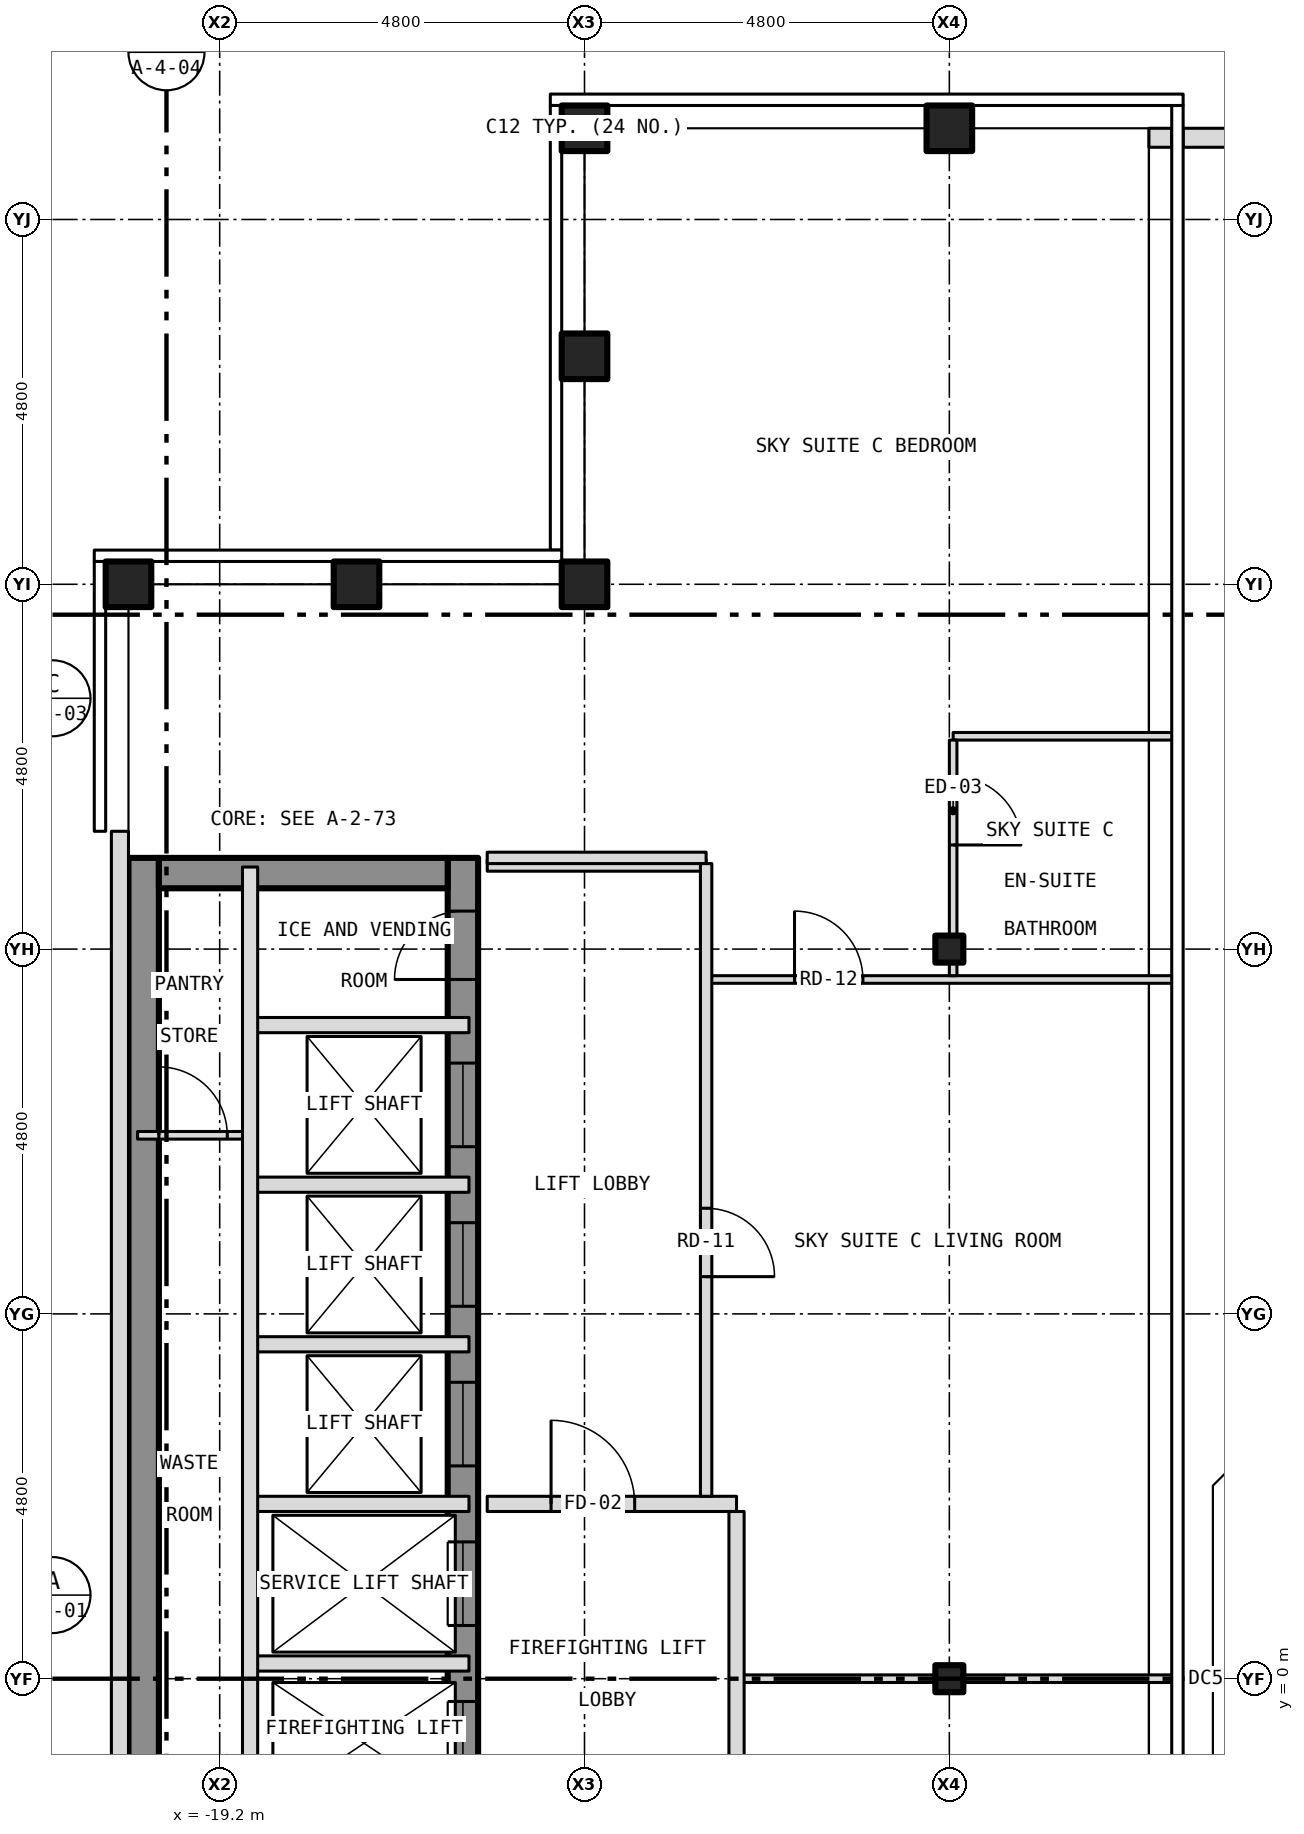
"""IFC4 building model, lengths in metres.
Left out: names, types, materials, properties, quantities, classifications, styles, units other than length and angle.
Written with IfcOpenShell. Run it as: python <this file> out.ifc"""

import sys

from ifc_helpers import new_model, si_unit, direction, frame, frame_2d, origin, origin_2d, place, context, subcontext, project, spatial, rectangle, hollow_rectangle, i_section, extrude, element, fill, save


model = new_model("IFC4")
c1 = context("Model", 3, precision=1e-05, world=origin(), true_north=direction((0.0, 1.0)))
c2 = subcontext(c1, "Body", "Model", "MODEL_VIEW")
j1 = project(units=[si_unit("LENGTHUNIT", "METRE"), si_unit("PLANEANGLEUNIT", "RADIAN")], contexts=[c1])
p1 = place(None, origin())
s1 = spatial("IfcSite", under=j1, at=p1, CompositionType="ELEMENT")
p2 = place(p1, origin())
s2 = spatial("IfcBuilding", under=s1, at=p2, CompositionType="ELEMENT")
p3 = place(p2, frame((0.0, 0.0, 265.5)))
s3 = spatial("IfcBuildingStorey", under=s2, at=p3, CompositionType="ELEMENT", Elevation=265.5)
for number, where, z_axis, x_axis in (
    (1, (-14.4, 20.4, -0.25), (0.0, 0.0, 1.0), (1.0, 0.0, 0.0)),
    (2, (-9.6, 20.4, -0.25), (0.0, 0.0, 1.0), (1.0, 0.0, 0.0)),
    (3, (-20.4, 14.4, -0.25), (0.0, 0.0, 1.0), (1.0, 0.0, 0.0)),
    (4, (-14.4, 14.4, -0.25), (0.0, 0.0, 1.0), (1.0, 0.0, 0.0)),
    (5, (-14.4, 17.4, -0.25), (0.0, 0.0, 1.0), (1.0, 0.0, 0.0)),
    (6, (-17.4, 14.4, -0.25), (0.0, 0.0, 1.0), (1.0, 0.0, 0.0)),
):
    element("IfcColumn", number, at=place(p3, frame(where, z_axis=z_axis, x_axis=x_axis)), inside=s3, PredefinedType="COLUMN", context=c2, shape_type="SweptSolid", body=[
        extrude(hollow_rectangle(XDim=0.6, YDim=0.6, WallThickness=0.03, at=origin_2d()), origin(), (0.0, 0.0, 1.0), 3.6),
    ])
for number, where, z_axis, x_axis in (
    (7, (-9.6, 0.0, -0.25), (0.0, 0.0, 1.0), (1.0, 0.0, 0.0)),
    (8, (-9.6, 9.6, -0.25), (0.0, 0.0, 1.0), (1.0, 0.0, 0.0)),
):
    element("IfcColumn", number, at=place(p3, frame(where, z_axis=z_axis, x_axis=x_axis)), inside=s3, PredefinedType="COLUMN", context=c2, shape_type="SweptSolid", body=[
        extrude(i_section(OverallWidth=0.368, OverallDepth=0.356, WebThickness=0.011, FlangeThickness=0.018, at=origin_2d()), origin(), (0.0, 0.0, 1.0), 3.6),
    ])
p4 = place(p3, frame((-16.0, -10.8, 0.0), z_axis=(0.0, 0.0, 1.0), x_axis=(0.0, 1.0, 0.0)))
e9 = element("IfcWall", 9, at=p4, inside=s3, PredefinedType="SHEAR", context=c2, shape_type="SweptSolid", body=[
    extrude(rectangle(XDim=21.6, YDim=0.4, at=frame_2d((10.8, 0.0))), origin(), (0.0, 0.0, 1.0), 3.25),
])
p5 = place(p4, frame((9.4, 0.0, 0.0)))
e10 = element("IfcOpeningElement", 10, at=p5, cuts=e9, PredefinedType="OPENING", context=c2, shape_type="SweptSolid", body=[
    extrude(rectangle(XDim=1.1, YDim=2.1, at=frame_2d((0.55, 1.05))), frame((0.0, 0.212, 0.0), z_axis=(0.0, -1.0, 0.0), x_axis=(1.0, 0.0, 0.0)), (0.0, 0.0, 1.0), 0.424),
])
p6 = place(p4, frame((11.5, 0.0, 0.0)))
e11 = element("IfcOpeningElement", 11, at=p6, cuts=e9, PredefinedType="OPENING", context=c2, shape_type="SweptSolid", body=[
    extrude(rectangle(XDim=1.1, YDim=2.1, at=frame_2d((0.55, 1.05))), frame((0.0, 0.212, 0.0), z_axis=(0.0, -1.0, 0.0), x_axis=(1.0, 0.0, 0.0)), (0.0, 0.0, 1.0), 0.424),
])
p7 = place(p4, frame((13.6, 0.0, 0.0)))
e12 = element("IfcOpeningElement", 12, at=p7, cuts=e9, PredefinedType="OPENING", context=c2, shape_type="SweptSolid", body=[
    extrude(rectangle(XDim=1.1, YDim=2.1, at=frame_2d((0.55, 1.05))), frame((0.0, 0.212, 0.0), z_axis=(0.0, -1.0, 0.0), x_axis=(1.0, 0.0, 0.0)), (0.0, 0.0, 1.0), 0.424),
])
p8 = place(p4, frame((15.7, 0.0, 0.0)))
e13 = element("IfcOpeningElement", 13, at=p8, cuts=e9, PredefinedType="OPENING", context=c2, shape_type="SweptSolid", body=[
    extrude(rectangle(XDim=1.1, YDim=2.1, at=frame_2d((0.55, 1.05))), frame((0.0, 0.212, 0.0), z_axis=(0.0, -1.0, 0.0), x_axis=(1.0, 0.0, 0.0)), (0.0, 0.0, 1.0), 0.424),
])
p9 = place(p4, frame((17.8, 0.0, 0.0)))
e14 = element("IfcOpeningElement", 14, at=p9, cuts=e9, PredefinedType="OPENING", context=c2, shape_type="SweptSolid", body=[
    extrude(rectangle(XDim=1.1, YDim=2.1, at=frame_2d((0.55, 1.05))), frame((0.0, 0.212, 0.0), z_axis=(0.0, -1.0, 0.0), x_axis=(1.0, 0.0, 0.0)), (0.0, 0.0, 1.0), 0.424),
])
p10 = place(p4, frame((0.458, 0.0, 0.0)))
e15 = element("IfcOpeningElement", 15, at=p10, cuts=e9, PredefinedType="OPENING", context=c2, shape_type="SweptSolid", body=[
    extrude(rectangle(XDim=1.1, YDim=2.1, at=frame_2d((0.55, 1.05))), frame((0.0, 0.212, 0.0), z_axis=(0.0, -1.0, 0.0), x_axis=(1.0, 0.0, 0.0)), (0.0, 0.0, 1.0), 0.424),
])
p11 = place(p4, frame((7.5, 0.0, 0.0)))
e16 = element("IfcOpeningElement", 16, at=p11, cuts=e9, PredefinedType="OPENING", context=c2, shape_type="SweptSolid", body=[
    extrude(rectangle(XDim=1.1, YDim=2.1, at=frame_2d((0.55, 1.05))), frame((0.0, 0.212, 0.0), z_axis=(0.0, -1.0, 0.0), x_axis=(1.0, 0.0, 0.0)), (0.0, 0.0, 1.0), 0.424),
])
p12 = place(p4, frame((20.0, 0.0, 0.0)))
e17 = element("IfcOpeningElement", 17, at=p12, cuts=e9, PredefinedType="OPENING", context=c2, shape_type="SweptSolid", body=[
    extrude(rectangle(XDim=0.9, YDim=2.1, at=frame_2d((0.45, 1.05))), frame((0.0, 0.212, 0.0), z_axis=(0.0, -1.0, 0.0), x_axis=(1.0, 0.0, 0.0)), (0.0, 0.0, 1.0), 0.424),
])
p13 = place(p3, frame((-20.2, -10.8, 0.0), z_axis=(0.0, 0.0, 1.0), x_axis=(0.0, 1.0, 0.0)))
e18 = element("IfcWall", 18, at=p13, inside=s3, PredefinedType="SHEAR", context=c2, shape_type="SweptSolid", body=[
    extrude(rectangle(XDim=21.6, YDim=0.4, at=frame_2d((10.8, 0.0))), origin(), (0.0, 0.0, 1.0), 3.25),
])
p14 = place(p3, frame((-20.0, 10.6, 0.0), z_axis=(0.0, 0.0, 1.0), x_axis=(1.0, 0.0, 0.0)))
e19 = element("IfcWall", 19, at=p14, inside=s3, PredefinedType="SHEAR", context=c2, shape_type="SweptSolid", body=[
    extrude(rectangle(XDim=3.8, YDim=0.4, at=frame_2d((1.9, 0.0))), origin(), (0.0, 0.0, 1.0), 3.25),
])
p15 = place(p3, frame((-20.512, 11.15, 0.0), z_axis=(0.0, 0.0, 1.0), x_axis=(0.0, -1.0, 0.0)))
e20 = element("IfcWall", 20, at=p15, inside=s3, PredefinedType="SOLIDWALL", context=c2, shape_type="SweptSolid", body=[
    extrude(rectangle(XDim=22.3, YDim=0.225, at=frame_2d((11.15, 0.0))), origin(), (0.0, 0.0, 1.0), 3.5),
])
p16 = place(p15, frame((18.4, 0.0, 1.0)))
e21 = element("IfcOpeningElement", 21, at=p16, cuts=e20, PredefinedType="OPENING", context=c2, shape_type="SweptSolid", body=[
    extrude(rectangle(XDim=0.6, YDim=1.5, at=frame_2d((0.3, 0.75))), frame((0.0, 0.125, 0.0), z_axis=(0.0, -1.0, 0.0), x_axis=(1.0, 0.0, 0.0)), (0.0, 0.0, 1.0), 0.249),
])
p17 = place(p3, frame((6.524, 20.275, 0.0), z_axis=(0.0, 0.0, 1.0), x_axis=(-1.0, 0.0, 0.0)))
e22 = element("IfcWall", 22, at=p17, inside=s3, PredefinedType="PARAPET", context=c2, shape_type="SweptSolid", body=[
    extrude(rectangle(XDim=13.048, YDim=0.25, at=frame_2d((6.524, 0.0))), origin(), (0.0, 0.0, 1.0), 1.1),
])
p18 = place(p3, frame((-6.674, 20.275, 0.0), z_axis=(0.0, 0.0, 1.0), x_axis=(-1.0, 0.0, 0.0)))
e23 = element("IfcWall", 23, at=p18, inside=s3, PredefinedType="PARAPET", context=c2, shape_type="SweptSolid", body=[
    extrude(rectangle(XDim=0.3, YDim=0.25, at=frame_2d((0.15, 0.0))), origin(), (0.0, 0.0, 1.0), 1.1),
])
p19 = place(p3, frame((-12.4, 0.0, 0.0), z_axis=(0.0, 0.0, 1.0), x_axis=(1.0, 0.0, 0.0)))
e24 = element("IfcWall", 24, at=p19, inside=s3, PredefinedType="PARTITIONING", context=c2, shape_type="SweptSolid", body=[
    extrude(rectangle(XDim=2.616, YDim=0.1, at=frame_2d((1.308, 0.0))), origin(), (0.0, 0.0, 1.0), 2.728),
])
p20 = place(p3, frame((-9.784, 0.0, 0.0), z_axis=(0.0, 0.0, 1.0), x_axis=(1.0, 0.0, 0.0)))
e25 = element("IfcWall", 25, at=p20, inside=s3, PredefinedType="PARTITIONING", context=c2, shape_type="SweptSolid", body=[
    extrude(rectangle(XDim=0.368, YDim=0.1, at=frame_2d((0.184, 0.0))), origin(), (0.0, 0.0, 1.0), 3.35),
])
p21 = place(p3, frame((-9.416, 0.0, 0.0), z_axis=(0.0, 0.0, 1.0), x_axis=(1.0, 0.0, 0.0)))
e26 = element("IfcWall", 26, at=p21, inside=s3, PredefinedType="PARTITIONING", context=c2, shape_type="SweptSolid", body=[
    extrude(rectangle(XDim=2.772, YDim=0.1, at=frame_2d((1.386, 0.0))), origin(), (0.0, 0.0, 1.0), 2.728),
])
for number, where, z_axis, x_axis in (
    (27, (-18.8, 0.2, 0.0), (0.0, 0.0, 1.0), (1.0, 0.0, 0.0)),
    (28, (-18.8, 2.3, 0.0), (0.0, 0.0, 1.0), (1.0, 0.0, 0.0)),
):
    element("IfcWall", number, at=place(p3, frame(where, z_axis=z_axis, x_axis=x_axis)), inside=s3, PredefinedType="PARTITIONING", context=c2, shape_type="SweptSolid", body=[
        extrude(rectangle(XDim=2.88, YDim=0.2, at=frame_2d((1.44, 0.0))), origin(), (0.0, 0.0, 1.0), 3.25),
    ])
p22 = place(p3, frame((-15.68, 2.3, 0.0), z_axis=(0.0, 0.0, 1.0), x_axis=(1.0, 0.0, 0.0)))
e29 = element("IfcWall", 29, at=p22, inside=s3, PredefinedType="PARTITIONING", context=c2, shape_type="SweptSolid", body=[
    extrude(rectangle(XDim=3.28, YDim=0.2, at=frame_2d((1.64, 0.0))), origin(), (0.0, 0.0, 1.0), 3.35),
])
p23 = place(p22, frame((0.84, 0.0, 0.0)))
e30 = element("IfcOpeningElement", 30, at=p23, cuts=e29, PredefinedType="OPENING", context=c2, shape_type="SweptSolid", body=[
    extrude(rectangle(XDim=1.1, YDim=2.1, at=frame_2d((0.55, 1.05))), frame((0.0, 0.112, 0.0), z_axis=(0.0, -1.0, 0.0), x_axis=(1.0, 0.0, 0.0)), (0.0, 0.0, 1.0), 0.224),
])
for number, where, z_axis, x_axis in (
    (31, (-18.8, 4.4, 0.0), (0.0, 0.0, 1.0), (1.0, 0.0, 0.0)),
    (32, (-18.8, 6.5, 0.0), (0.0, 0.0, 1.0), (1.0, 0.0, 0.0)),
):
    element("IfcWall", number, at=place(p3, frame(where, z_axis=z_axis, x_axis=x_axis)), inside=s3, PredefinedType="PARTITIONING", context=c2, shape_type="SweptSolid", body=[
        extrude(rectangle(XDim=2.88, YDim=0.2, at=frame_2d((1.44, 0.0))), origin(), (0.0, 0.0, 1.0), 3.25),
    ])
p24 = place(p3, frame((-20.28, 7.15, 0.0), z_axis=(0.0, 0.0, 1.0), x_axis=(1.0, 0.0, 0.0)))
e33 = element("IfcWall", 33, at=p24, inside=s3, PredefinedType="PARTITIONING", context=c2, shape_type="SweptSolid", body=[
    extrude(rectangle(XDim=1.48, YDim=0.1, at=frame_2d((0.74, 0.0))), origin(), (0.0, 0.0, 1.0), 3.25),
])
p25 = place(p24, frame((0.28, 0.0, 0.0)))
e34 = element("IfcOpeningElement", 34, at=p25, cuts=e33, PredefinedType="OPENING", context=c2, shape_type="SweptSolid", body=[
    extrude(rectangle(XDim=0.9, YDim=2.1, at=frame_2d((0.45, 1.05))), frame((0.0, 0.062, 0.0), z_axis=(0.0, -1.0, 0.0), x_axis=(1.0, 0.0, 0.0)), (0.0, 0.0, 1.0), 0.124),
])
p26 = place(p3, frame((-18.8, 8.6, 0.0), z_axis=(0.0, 0.0, 1.0), x_axis=(1.0, 0.0, 0.0)))
e35 = element("IfcWall", 35, at=p26, inside=s3, PredefinedType="PARTITIONING", context=c2, shape_type="SweptSolid", body=[
    extrude(rectangle(XDim=2.88, YDim=0.2, at=frame_2d((1.44, 0.0))), origin(), (0.0, 0.0, 1.0), 3.25),
])
p27 = place(p3, frame((-12.8, 9.2, 0.0), z_axis=(0.0, 0.0, 1.0), x_axis=(1.0, 0.0, 0.0)))
e36 = element("IfcWall", 36, at=p27, inside=s3, PredefinedType="PARTITIONING", context=c2, shape_type="SweptSolid", body=[
    extrude(rectangle(XDim=6.156, YDim=0.1, at=frame_2d((3.078, 0.0))), origin(), (0.0, 0.0, 1.0), 3.35),
])
p28 = place(p27, frame((1.163, 0.0, 0.0)))
e37 = element("IfcOpeningElement", 37, at=p28, cuts=e36, PredefinedType="OPENING", context=c2, shape_type="SweptSolid", body=[
    extrude(rectangle(XDim=0.9, YDim=2.1, at=frame_2d((0.45, 1.05))), frame((0.0, 0.062, 0.0), z_axis=(0.0, -1.0, 0.0), x_axis=(1.0, 0.0, 0.0)), (0.0, 0.0, 1.0), 0.124),
])
for number, where, z_axis, x_axis in (
    (38, (-15.68, 10.7, 0.0), (0.0, 0.0, 1.0), (1.0, 0.0, 0.0)),
    (39, (-15.68, 10.8, 0.0), (0.0, 0.0, 1.0), (1.0, 0.0, 0.0)),
):
    element("IfcWall", number, at=place(p3, frame(where, z_axis=z_axis, x_axis=x_axis)), inside=s3, PredefinedType="PARTITIONING", context=c2, shape_type="SweptSolid", body=[
        extrude(rectangle(XDim=2.88, YDim=0.15, at=frame_2d((1.44, 0.0))), origin(), (0.0, 0.0, 1.0), 3.35),
    ])
p29 = place(p3, frame((-9.55, 12.4, 0.0), z_axis=(0.0, 0.0, 1.0), x_axis=(1.0, 0.0, 0.0)))
e40 = element("IfcWall", 40, at=p29, inside=s3, PredefinedType="PARTITIONING", context=c2, shape_type="SweptSolid", body=[
    extrude(rectangle(XDim=2.906, YDim=0.1, at=frame_2d((1.453, 0.0))), origin(), (0.0, 0.0, 1.0), 3.35),
])
p30 = place(p3, frame((-18.8, -1.8, 0.0), z_axis=(0.0, 0.0, 1.0), x_axis=(0.0, 1.0, 0.0)))
e41 = element("IfcWall", 41, at=p30, inside=s3, PredefinedType="PARTITIONING", context=c2, shape_type="SweptSolid", body=[
    extrude(rectangle(XDim=12.48, YDim=0.2, at=frame_2d((6.24, 0.0))), origin(), (0.0, 0.0, 1.0), 3.25),
])
p31 = place(p3, frame((-12.8, 2.4, 0.0), z_axis=(0.0, 0.0, 1.0), x_axis=(0.0, 1.0, 0.0)))
e42 = element("IfcWall", 42, at=p31, inside=s3, PredefinedType="PARTITIONING", context=c2, shape_type="SweptSolid", body=[
    extrude(rectangle(XDim=8.325, YDim=0.15, at=frame_2d((4.163, 0.0))), origin(), (0.0, 0.0, 1.0), 3.35),
])
p32 = place(p31, frame((2.89, 0.0, 0.0)))
e43 = element("IfcOpeningElement", 43, at=p32, cuts=e42, PredefinedType="OPENING", context=c2, shape_type="SweptSolid", body=[
    extrude(rectangle(XDim=0.9, YDim=2.1, at=frame_2d((0.45, 1.05))), frame((0.0, 0.087, 0.0), z_axis=(0.0, -1.0, 0.0), x_axis=(1.0, 0.0, 0.0)), (0.0, 0.0, 1.0), 0.174),
])
p33 = place(p3, frame((-12.4, -1.8, 0.0), z_axis=(0.0, 0.0, 1.0), x_axis=(0.0, 1.0, 0.0)))
e44 = element("IfcWall", 44, at=p33, inside=s3, PredefinedType="PARTITIONING", context=c2, shape_type="SweptSolid", body=[
    extrude(rectangle(XDim=4.0, YDim=0.2, at=frame_2d((2.0, 0.0))), origin(), (0.0, 0.0, 1.0), 3.35),
])
p34 = place(p3, frame((-9.55, 9.25, 0.0), z_axis=(0.0, 0.0, 1.0), x_axis=(0.0, 1.0, 0.0)))
e45 = element("IfcWall", 45, at=p34, inside=s3, PredefinedType="PARTITIONING", context=c2, shape_type="SweptSolid", body=[
    extrude(rectangle(XDim=0.534, YDim=0.1, at=frame_2d((0.267, 0.0))), origin(), (0.0, 0.0, 1.0), 3.35),
])
p35 = place(p3, frame((-9.55, 9.784, 0.0), z_axis=(0.0, 0.0, 1.0), x_axis=(0.0, 1.0, 0.0)))
e46 = element("IfcWall", 46, at=p35, inside=s3, PredefinedType="PARTITIONING", context=c2, shape_type="SweptSolid", body=[
    extrude(rectangle(XDim=2.566, YDim=0.1, at=frame_2d((1.283, 0.0))), origin(), (0.0, 0.0, 1.0), 2.728),
])
p36 = place(p35, frame((1.186, 0.0, 0.0)))
e47 = element("IfcOpeningElement", 47, at=p36, cuts=e46, PredefinedType="OPENING", context=c2, shape_type="SweptSolid", body=[
    extrude(rectangle(XDim=0.9, YDim=2.1, at=frame_2d((0.45, 1.05))), frame((0.0, 0.062, 0.0), z_axis=(0.0, -1.0, 0.0), x_axis=(1.0, 0.0, 0.0)), (0.0, 0.0, 1.0), 0.124),
])
p37 = place(p5, origin())
e48 = element("IfcDoor", 48, at=p37, inside=s3, OperationType="SLIDING_TO_LEFT", PredefinedType="DOOR", context=c2, shape_type="SweptSolid", body=[
    extrude(rectangle(XDim=1.1, YDim=2.1, at=frame_2d((0.55, 1.05))), frame((0.0, 0.025, 0.0), z_axis=(0.0, -1.0, 0.0), x_axis=(1.0, 0.0, 0.0)), (0.0, 0.0, 1.0), 0.05),
])
fill(e10, e48)
p38 = place(p6, origin())
e49 = element("IfcDoor", 49, at=p38, inside=s3, OperationType="SLIDING_TO_LEFT", PredefinedType="DOOR", context=c2, shape_type="SweptSolid", body=[
    extrude(rectangle(XDim=1.1, YDim=2.1, at=frame_2d((0.55, 1.05))), frame((0.0, 0.025, 0.0), z_axis=(0.0, -1.0, 0.0), x_axis=(1.0, 0.0, 0.0)), (0.0, 0.0, 1.0), 0.05),
])
fill(e11, e49)
p39 = place(p7, origin())
e50 = element("IfcDoor", 50, at=p39, inside=s3, OperationType="SLIDING_TO_LEFT", PredefinedType="DOOR", context=c2, shape_type="SweptSolid", body=[
    extrude(rectangle(XDim=1.1, YDim=2.1, at=frame_2d((0.55, 1.05))), frame((0.0, 0.025, 0.0), z_axis=(0.0, -1.0, 0.0), x_axis=(1.0, 0.0, 0.0)), (0.0, 0.0, 1.0), 0.05),
])
fill(e12, e50)
p40 = place(p8, origin())
e51 = element("IfcDoor", 51, at=p40, inside=s3, OperationType="SLIDING_TO_LEFT", PredefinedType="DOOR", context=c2, shape_type="SweptSolid", body=[
    extrude(rectangle(XDim=1.1, YDim=2.1, at=frame_2d((0.55, 1.05))), frame((0.0, 0.025, 0.0), z_axis=(0.0, -1.0, 0.0), x_axis=(1.0, 0.0, 0.0)), (0.0, 0.0, 1.0), 0.05),
])
fill(e13, e51)
p41 = place(p9, origin())
e52 = element("IfcDoor", 52, at=p41, inside=s3, OperationType="SLIDING_TO_LEFT", PredefinedType="DOOR", context=c2, shape_type="SweptSolid", body=[
    extrude(rectangle(XDim=1.1, YDim=2.1, at=frame_2d((0.55, 1.05))), frame((0.0, 0.025, 0.0), z_axis=(0.0, -1.0, 0.0), x_axis=(1.0, 0.0, 0.0)), (0.0, 0.0, 1.0), 0.05),
])
fill(e14, e52)
p42 = place(p12, origin())
e53 = element("IfcDoor", 53, at=p42, inside=s3, OperationType="SINGLE_SWING_LEFT", PredefinedType="DOOR", context=c2, shape_type="SweptSolid", body=[
    extrude(rectangle(XDim=0.9, YDim=2.1, at=frame_2d((0.45, 1.05))), frame((0.0, 0.025, 0.0), z_axis=(0.0, -1.0, 0.0), x_axis=(1.0, 0.0, 0.0)), (0.0, 0.0, 1.0), 0.05),
])
fill(e17, e53)
p43 = place(p25, origin())
e54 = element("IfcDoor", 54, at=p43, inside=s3, OperationType="SINGLE_SWING_LEFT", PredefinedType="DOOR", context=c2, shape_type="SweptSolid", body=[
    extrude(rectangle(XDim=0.9, YDim=2.1, at=frame_2d((0.45, 1.05))), frame((0.0, 0.025, 0.0), z_axis=(0.0, -1.0, 0.0), x_axis=(1.0, 0.0, 0.0)), (0.0, 0.0, 1.0), 0.05),
])
fill(e34, e54)
p44 = place(p23, origin())
e55 = element("IfcDoor", 55, at=p44, inside=s3, OperationType="SINGLE_SWING_LEFT", PredefinedType="DOOR", context=c2, shape_type="SweptSolid", body=[
    extrude(rectangle(XDim=1.1, YDim=2.1, at=frame_2d((0.55, 1.05))), frame((0.0, 0.025, 0.0), z_axis=(0.0, -1.0, 0.0), x_axis=(1.0, 0.0, 0.0)), (0.0, 0.0, 1.0), 0.05),
])
fill(e30, e55)
p45 = place(p32, origin())
e56 = element("IfcDoor", 56, at=p45, inside=s3, OperationType="SINGLE_SWING_LEFT", PredefinedType="DOOR", context=c2, shape_type="SweptSolid", body=[
    extrude(rectangle(XDim=0.9, YDim=2.1, at=frame_2d((0.45, 1.05))), frame((0.0, 0.025, 0.0), z_axis=(0.0, -1.0, 0.0), x_axis=(1.0, 0.0, 0.0)), (0.0, 0.0, 1.0), 0.05),
])
fill(e43, e56)
p46 = place(p28, origin())
e57 = element("IfcDoor", 57, at=p46, inside=s3, OperationType="SINGLE_SWING_LEFT", PredefinedType="DOOR", context=c2, shape_type="SweptSolid", body=[
    extrude(rectangle(XDim=0.9, YDim=2.1, at=frame_2d((0.45, 1.05))), frame((0.0, 0.025, 0.0), z_axis=(0.0, -1.0, 0.0), x_axis=(1.0, 0.0, 0.0)), (0.0, 0.0, 1.0), 0.05),
])
fill(e37, e57)
p47 = place(p36, origin())
e58 = element("IfcDoor", 58, at=p47, inside=s3, OperationType="SINGLE_SWING_LEFT", PredefinedType="DOOR", context=c2, shape_type="SweptSolid", body=[
    extrude(rectangle(XDim=0.9, YDim=2.1, at=frame_2d((0.45, 1.05))), frame((0.0, 0.025, 0.0), z_axis=(0.0, -1.0, 0.0), x_axis=(1.0, 0.0, 0.0)), (0.0, 0.0, 1.0), 0.05),
])
fill(e47, e58)
save(model, sys.argv[1])
